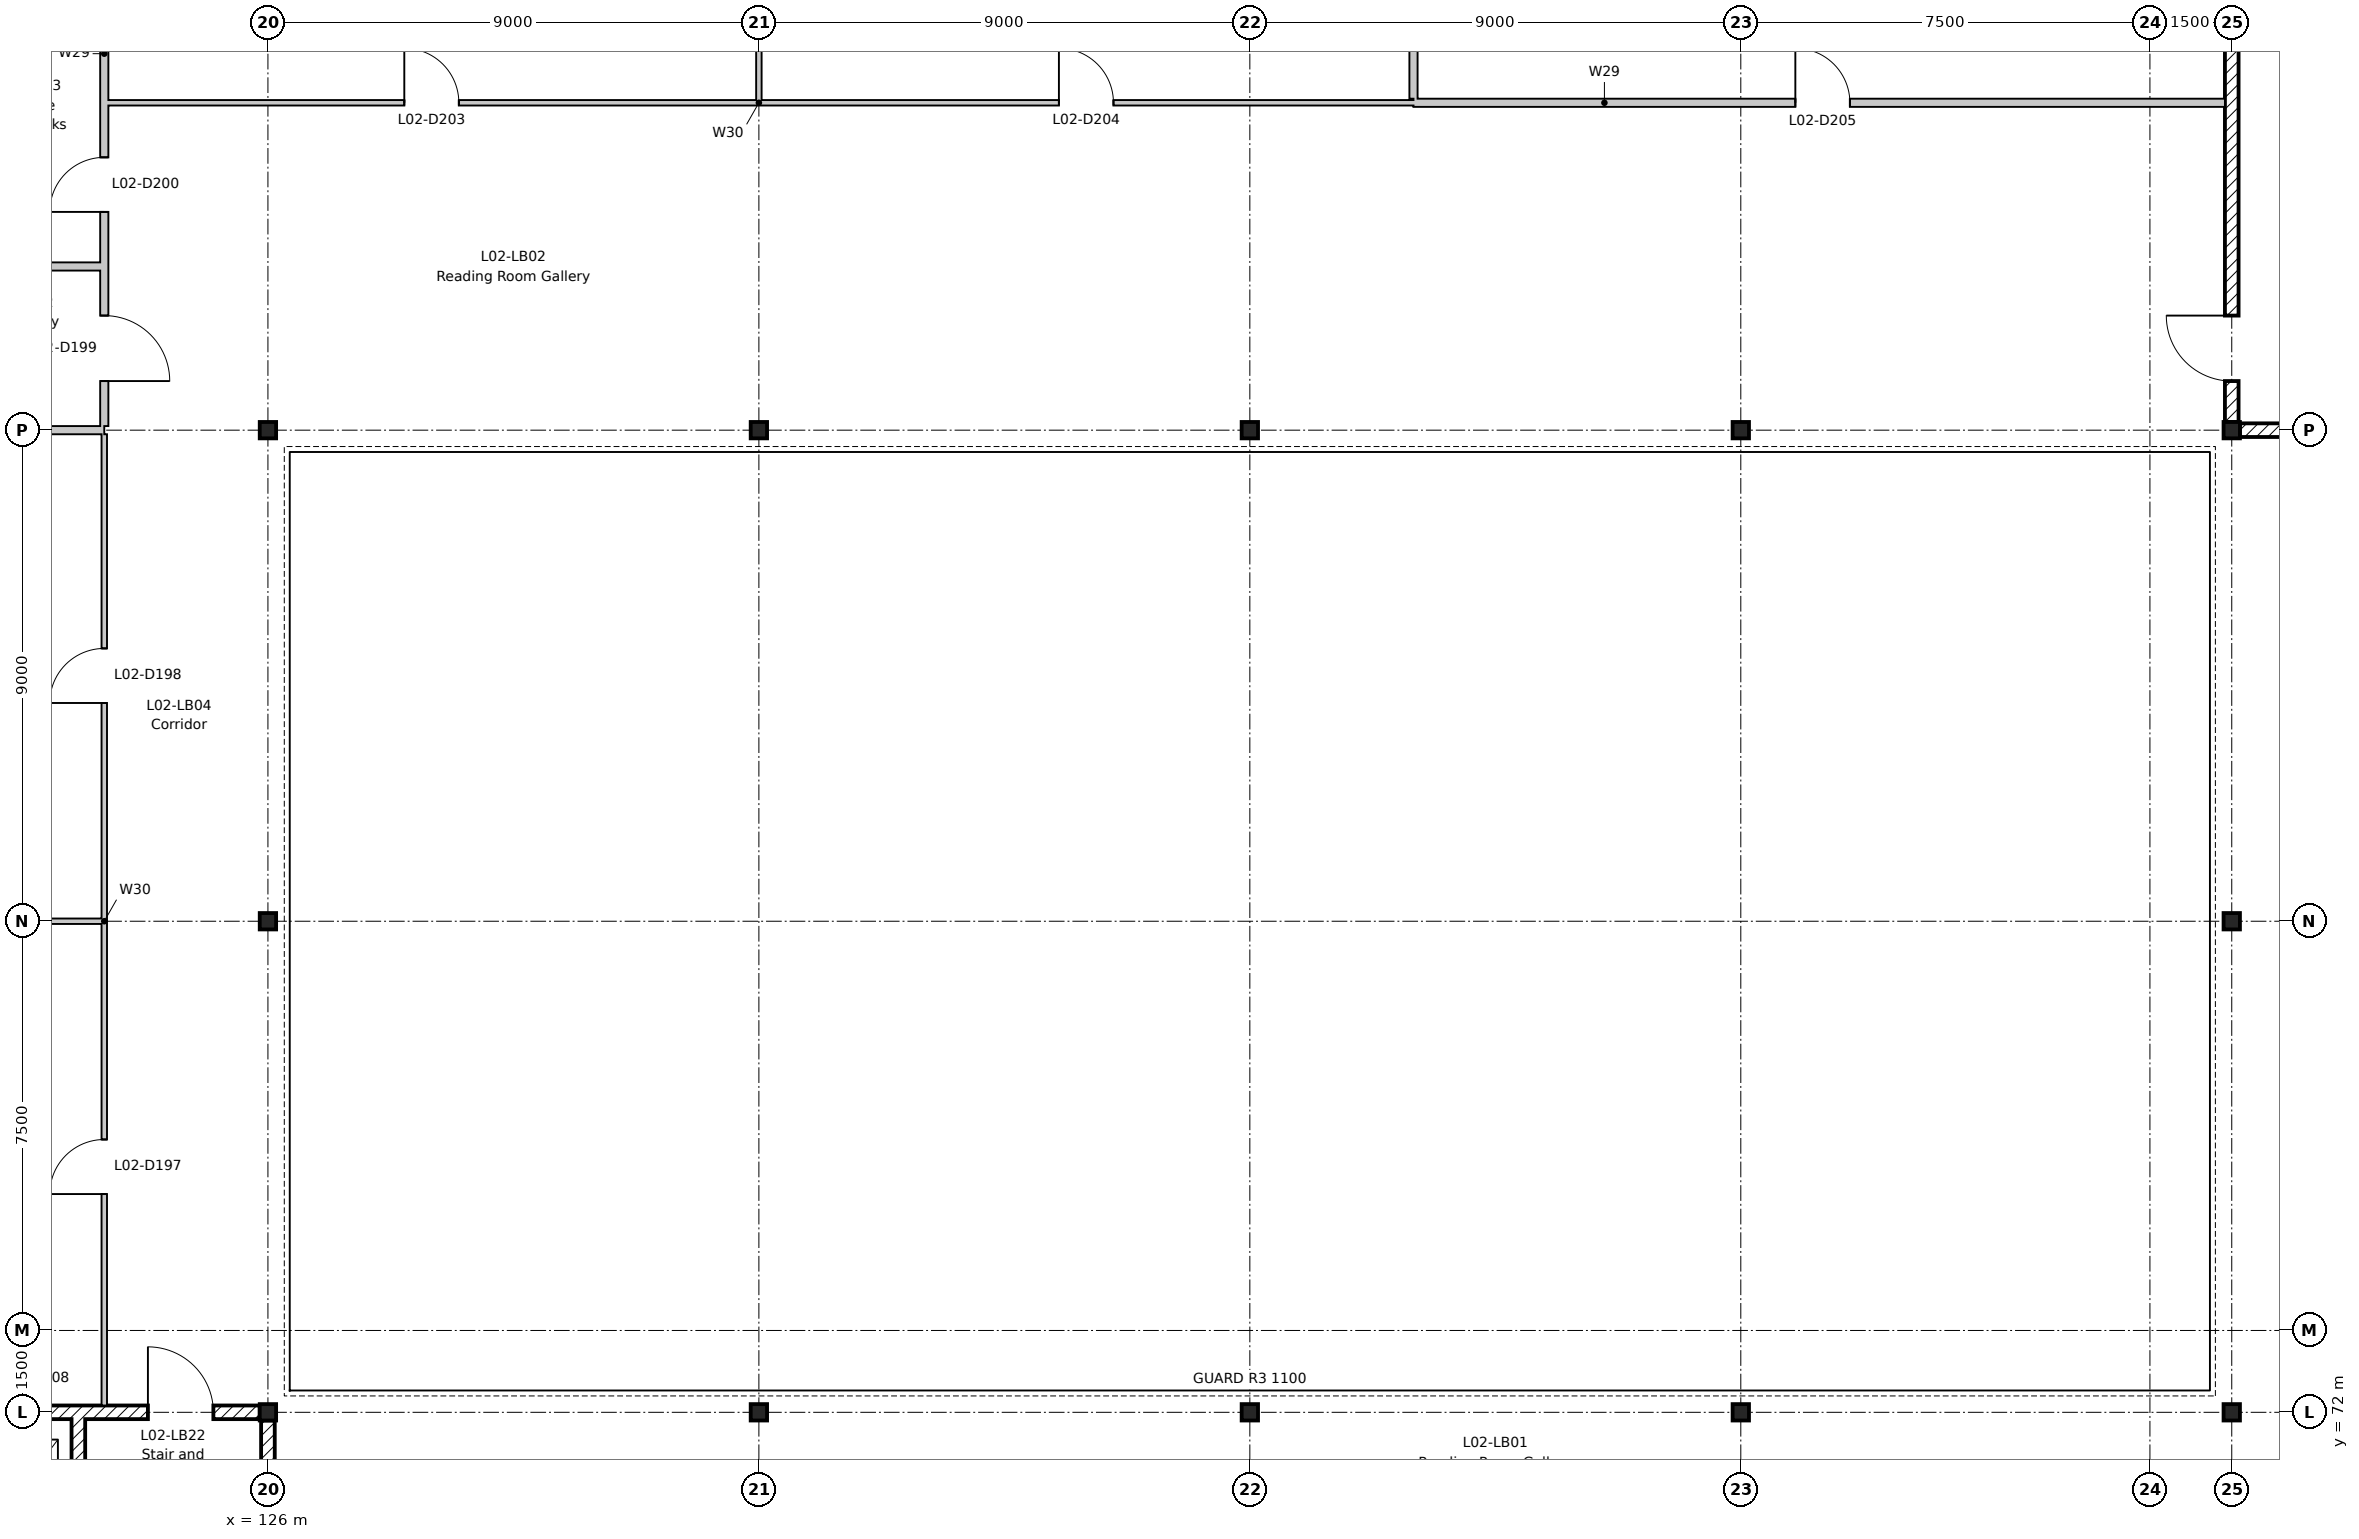
"""IFC4 building model, lengths in metres.
Left out: names, types, materials, properties, quantities, classifications, styles, units other than length and angle.
Written with IfcOpenShell. Run it as: python <this file> out.ifc"""

import sys

from ifc_helpers import new_model, si_unit, direction, frame, frame_2d, origin, origin_2d, place, context, subcontext, project, spatial, rectangle, i_section, extrude, element, fill, save


model = new_model("IFC4")
c1 = context("Model", 3, precision=1e-05, world=origin(), true_north=direction((0.0, 1.0)))
c2 = subcontext(c1, "Body", "Model", "MODEL_VIEW")
j1 = project(units=[si_unit("LENGTHUNIT", "METRE"), si_unit("PLANEANGLEUNIT", "RADIAN")], contexts=[c1])
p1 = place(None, origin())
s1 = spatial("IfcSite", under=j1, at=p1, CompositionType="ELEMENT")
p2 = place(p1, origin())
s2 = spatial("IfcBuilding", under=s1, at=p2, CompositionType="ELEMENT")
p3 = place(p2, frame((0.0, 0.0, 9.9)))
s3 = spatial("IfcBuildingStorey", under=s2, at=p3, CompositionType="ELEMENT", Elevation=9.9)
for number, where, z_axis, x_axis in (
    (1, (126.0, 72.0, -0.2), (0.0, 0.0, 1.0), (1.0, 0.0, 0.0)),
    (2, (126.0, 81.0, -0.2), (0.0, 0.0, 1.0), (1.0, 0.0, 0.0)),
    (3, (126.0, 90.0, -0.2), (0.0, 0.0, 1.0), (1.0, 0.0, 0.0)),
    (4, (135.0, 72.0, -0.2), (0.0, 0.0, 1.0), (1.0, 0.0, 0.0)),
    (5, (135.0, 90.0, -0.2), (0.0, 0.0, 1.0), (1.0, 0.0, 0.0)),
    (6, (144.0, 72.0, -0.2), (0.0, 0.0, 1.0), (1.0, 0.0, 0.0)),
    (7, (144.0, 90.0, -0.2), (0.0, 0.0, 1.0), (1.0, 0.0, 0.0)),
    (8, (153.0, 72.0, -0.2), (0.0, 0.0, 1.0), (1.0, 0.0, 0.0)),
    (9, (153.0, 90.0, -0.2), (0.0, 0.0, 1.0), (1.0, 0.0, 0.0)),
    (10, (162.0, 72.0, -0.2), (0.0, 0.0, 1.0), (1.0, 0.0, 0.0)),
    (11, (162.0, 81.0, -0.2), (0.0, 0.0, 1.0), (1.0, 0.0, 0.0)),
    (12, (162.0, 90.0, -0.2), (0.0, 0.0, 1.0), (1.0, 0.0, 0.0)),
):
    element("IfcColumn", number, at=place(p3, frame(where, z_axis=z_axis, x_axis=x_axis)), inside=s3, PredefinedType="COLUMN", context=c2, shape_type="SweptSolid", body=[
        extrude(i_section(OverallWidth=0.3, OverallDepth=0.3, WebThickness=0.011, FlangeThickness=0.019, FilletRadius=0.027, at=origin_2d()), origin(), (0.0, 0.0, 1.0), 4.45),
    ])
p4 = place(p3, frame((126.0, 63.2, 0.0), z_axis=(0.0, 0.0, 1.0), x_axis=(0.0, 1.0, 0.0)))
e13 = element("IfcWall", 13, at=p4, inside=s3, PredefinedType="SHEAR", context=c2, shape_type="SweptSolid", body=[
    extrude(rectangle(XDim=8.65, YDim=0.25, at=frame_2d((4.325, 0.0))), origin(), (0.0, 0.0, 1.0), 4.25),
])
p5 = place(p4, frame((6.7, 0.0, 0.0)))
e14 = element("IfcOpeningElement", 14, at=p5, cuts=e13, PredefinedType="OPENING", context=c2, shape_type="SweptSolid", body=[
    extrude(rectangle(XDim=1.2, YDim=2.1, at=frame_2d((0.6, 1.05))), frame((0.0, 0.135, 0.0), z_axis=(0.0, -1.0, 0.0), x_axis=(1.0, 0.0, 0.0)), (0.0, 0.0, 1.0), 0.27),
])
p6 = place(p3, frame((117.2, 72.0, 0.0), z_axis=(0.0, 0.0, 1.0), x_axis=(1.0, 0.0, 0.0)))
e15 = element("IfcWall", 15, at=p6, inside=s3, PredefinedType="SHEAR", context=c2, shape_type="SweptSolid", body=[
    extrude(rectangle(XDim=8.65, YDim=0.25, at=frame_2d((4.325, 0.0))), origin(), (0.0, 0.0, 1.0), 4.25),
])
p7 = place(p6, frame((6.6, 0.0, 0.0)))
e16 = element("IfcOpeningElement", 16, at=p7, cuts=e15, PredefinedType="OPENING", context=c2, shape_type="SweptSolid", body=[
    extrude(rectangle(XDim=1.2, YDim=2.1, at=frame_2d((0.6, 1.05))), frame((0.0, 0.135, 0.0), z_axis=(0.0, -1.0, 0.0), x_axis=(1.0, 0.0, 0.0)), (0.0, 0.0, 1.0), 0.27),
])
p8 = place(p3, frame((122.525, 69.275, 0.0), z_axis=(0.0, 0.0, 1.0), x_axis=(0.0, 1.0, 0.0)))
e17 = element("IfcWall", 17, at=p8, inside=s3, PredefinedType="SHEAR", context=c2, shape_type="SweptSolid", body=[
    extrude(rectangle(XDim=2.6, YDim=0.25, at=frame_2d((1.3, 0.0))), origin(), (0.0, 0.0, 1.0), 4.25),
])
p9 = place(p3, frame((162.0, 98.8, 0.0), z_axis=(0.0, 0.0, 1.0), x_axis=(0.0, -1.0, 0.0)))
e18 = element("IfcWall", 18, at=p9, inside=s3, PredefinedType="SHEAR", context=c2, shape_type="SweptSolid", body=[
    extrude(rectangle(XDim=8.65, YDim=0.25, at=frame_2d((4.325, 0.0))), origin(), (0.0, 0.0, 1.0), 4.25),
])
p10 = place(p9, frame((6.7, 0.0, 0.0)))
e19 = element("IfcOpeningElement", 19, at=p10, cuts=e18, PredefinedType="OPENING", context=c2, shape_type="SweptSolid", body=[
    extrude(rectangle(XDim=1.2, YDim=2.1, at=frame_2d((0.6, 1.05))), frame((0.0, 0.135, 0.0), z_axis=(0.0, -1.0, 0.0), x_axis=(1.0, 0.0, 0.0)), (0.0, 0.0, 1.0), 0.27),
])
p11 = place(p3, frame((170.8, 90.0, 0.0), z_axis=(0.0, 0.0, 1.0), x_axis=(-1.0, 0.0, 0.0)))
e20 = element("IfcWall", 20, at=p11, inside=s3, PredefinedType="SHEAR", context=c2, shape_type="SweptSolid", body=[
    extrude(rectangle(XDim=8.65, YDim=0.25, at=frame_2d((4.325, 0.0))), origin(), (0.0, 0.0, 1.0), 4.25),
])
p12 = place(p11, frame((6.6, 0.0, 0.0)))
e21 = element("IfcOpeningElement", 21, at=p12, cuts=e20, PredefinedType="OPENING", context=c2, shape_type="SweptSolid", body=[
    extrude(rectangle(XDim=1.2, YDim=2.1, at=frame_2d((0.6, 1.05))), frame((0.0, 0.135, 0.0), z_axis=(0.0, -1.0, 0.0), x_axis=(1.0, 0.0, 0.0)), (0.0, 0.0, 1.0), 0.27),
])
p13 = place(p3, frame((117.2, 81.0, 0.0), z_axis=(0.0, 0.0, 1.0), x_axis=(1.0, 0.0, 0.0)))
e22 = element("IfcWall", 22, at=p13, inside=s3, PredefinedType="PARTITIONING", context=c2, shape_type="SweptSolid", body=[
    extrude(rectangle(XDim=5.75, YDim=0.1, at=frame_2d((2.875, 0.0))), origin(), (0.0, 0.0, 1.0), 4.25),
])
p14 = place(p3, frame((120.3, 90.0, 0.0), z_axis=(0.0, 0.0, 1.0), x_axis=(1.0, 0.0, 0.0)))
e23 = element("IfcWall", 23, at=p14, inside=s3, PredefinedType="PARTITIONING", context=c2, shape_type="SweptSolid", body=[
    extrude(rectangle(XDim=2.7, YDim=0.15, at=frame_2d((1.35, 0.0))), origin(), (0.0, 0.0, 1.0), 4.25),
])
p15 = place(p3, frame((120.3, 93.0, 0.0), z_axis=(0.0, 0.0, 1.0), x_axis=(1.0, 0.0, 0.0)))
e24 = element("IfcWall", 24, at=p15, inside=s3, PredefinedType="PARTITIONING", context=c2, shape_type="SweptSolid", body=[
    extrude(rectangle(XDim=2.625, YDim=0.15, at=frame_2d((1.312, 0.0))), origin(), (0.0, 0.0, 1.0), 4.25),
])
p16 = place(p3, frame((147.0, 96.0, 0.0), z_axis=(0.0, 0.0, 1.0), x_axis=(1.0, 0.0, 0.0)))
e25 = element("IfcWall", 25, at=p16, inside=s3, PredefinedType="PARTITIONING", context=c2, shape_type="SweptSolid", body=[
    extrude(rectangle(XDim=14.875, YDim=0.15, at=frame_2d((7.438, 0.0))), origin(), (0.0, 0.0, 1.0), 4.25),
])
p17 = place(p16, frame((7.0, 0.0, 0.0)))
e26 = element("IfcOpeningElement", 26, at=p17, cuts=e25, PredefinedType="OPENING", context=c2, shape_type="SweptSolid", body=[
    extrude(rectangle(XDim=1.0, YDim=2.1, at=frame_2d((0.5, 1.05))), frame((0.0, 0.085, 0.0), z_axis=(0.0, -1.0, 0.0), x_axis=(1.0, 0.0, 0.0)), (0.0, 0.0, 1.0), 0.17),
])
p18 = place(p3, frame((123.075, 96.0, 0.0), z_axis=(0.0, 0.0, 1.0), x_axis=(1.0, 0.0, 0.0)))
e27 = element("IfcWall", 27, at=p18, inside=s3, PredefinedType="PARTITIONING", context=c2, shape_type="SweptSolid", body=[
    extrude(rectangle(XDim=23.925, YDim=0.1, at=frame_2d((11.962, 0.0))), origin(), (0.0, 0.0, 1.0), 4.25),
])
p19 = place(p18, frame((5.425, 0.0, 0.0)))
e28 = element("IfcOpeningElement", 28, at=p19, cuts=e27, PredefinedType="OPENING", context=c2, shape_type="SweptSolid", body=[
    extrude(rectangle(XDim=1.0, YDim=2.1, at=frame_2d((0.5, 1.05))), frame((0.0, 0.06, 0.0), z_axis=(0.0, -1.0, 0.0), x_axis=(1.0, 0.0, 0.0)), (0.0, 0.0, 1.0), 0.12),
])
p20 = place(p18, frame((17.425, 0.0, 0.0)))
e29 = element("IfcOpeningElement", 29, at=p20, cuts=e27, PredefinedType="OPENING", context=c2, shape_type="SweptSolid", body=[
    extrude(rectangle(XDim=1.0, YDim=2.1, at=frame_2d((0.5, 1.05))), frame((0.0, 0.06, 0.0), z_axis=(0.0, -1.0, 0.0), x_axis=(1.0, 0.0, 0.0)), (0.0, 0.0, 1.0), 0.12),
])
p21 = place(p3, frame((123.0, 90.075, 0.0), z_axis=(0.0, 0.0, 1.0), x_axis=(0.0, 1.0, 0.0)))
e30 = element("IfcWall", 30, at=p21, inside=s3, PredefinedType="PARTITIONING", context=c2, shape_type="SweptSolid", body=[
    extrude(rectangle(XDim=8.725, YDim=0.15, at=frame_2d((4.363, 0.0))), origin(), (0.0, 0.0, 1.0), 4.25),
])
p22 = place(p21, frame((0.825, 0.0, 0.0)))
e31 = element("IfcOpeningElement", 31, at=p22, cuts=e30, PredefinedType="OPENING", context=c2, shape_type="SweptSolid", body=[
    extrude(rectangle(XDim=1.2, YDim=2.1, at=frame_2d((0.6, 1.05))), frame((0.0, 0.085, 0.0), z_axis=(0.0, -1.0, 0.0), x_axis=(1.0, 0.0, 0.0)), (0.0, 0.0, 1.0), 0.17),
])
p23 = place(p21, frame((3.925, 0.0, 0.0)))
e32 = element("IfcOpeningElement", 32, at=p23, cuts=e30, PredefinedType="OPENING", context=c2, shape_type="SweptSolid", body=[
    extrude(rectangle(XDim=1.0, YDim=2.1, at=frame_2d((0.5, 1.05))), frame((0.0, 0.085, 0.0), z_axis=(0.0, -1.0, 0.0), x_axis=(1.0, 0.0, 0.0)), (0.0, 0.0, 1.0), 0.17),
])
p24 = place(p3, frame((123.0, 72.125, 0.0), z_axis=(0.0, 0.0, 1.0), x_axis=(0.0, 1.0, 0.0)))
e33 = element("IfcWall", 33, at=p24, inside=s3, PredefinedType="PARTITIONING", context=c2, shape_type="SweptSolid", body=[
    extrude(rectangle(XDim=17.8, YDim=0.1, at=frame_2d((8.9, 0.0))), origin(), (0.0, 0.0, 1.0), 4.25),
])
p25 = place(p24, frame((3.875, 0.0, 0.0)))
e34 = element("IfcOpeningElement", 34, at=p25, cuts=e33, PredefinedType="OPENING", context=c2, shape_type="SweptSolid", body=[
    extrude(rectangle(XDim=1.0, YDim=2.1, at=frame_2d((0.5, 1.05))), frame((0.0, 0.06, 0.0), z_axis=(0.0, -1.0, 0.0), x_axis=(1.0, 0.0, 0.0)), (0.0, 0.0, 1.0), 0.12),
])
p26 = place(p24, frame((12.875, 0.0, 0.0)))
e35 = element("IfcOpeningElement", 35, at=p26, cuts=e33, PredefinedType="OPENING", context=c2, shape_type="SweptSolid", body=[
    extrude(rectangle(XDim=1.0, YDim=2.1, at=frame_2d((0.5, 1.05))), frame((0.0, 0.06, 0.0), z_axis=(0.0, -1.0, 0.0), x_axis=(1.0, 0.0, 0.0)), (0.0, 0.0, 1.0), 0.12),
])
p27 = place(p3, frame((135.0, 96.05, 0.0), z_axis=(0.0, 0.0, 1.0), x_axis=(0.0, 1.0, 0.0)))
e36 = element("IfcWall", 36, at=p27, inside=s3, PredefinedType="PARTITIONING", context=c2, shape_type="SweptSolid", body=[
    extrude(rectangle(XDim=2.75, YDim=0.1, at=frame_2d((1.375, 0.0))), origin(), (0.0, 0.0, 1.0), 4.25),
])
p28 = place(p3, frame((147.0, 96.075, 0.0), z_axis=(0.0, 0.0, 1.0), x_axis=(0.0, 1.0, 0.0)))
e37 = element("IfcWall", 37, at=p28, inside=s3, PredefinedType="PARTITIONING", context=c2, shape_type="SweptSolid", body=[
    extrude(rectangle(XDim=2.725, YDim=0.15, at=frame_2d((1.363, 0.0))), origin(), (0.0, 0.0, 1.0), 4.25),
])
p29 = place(p25, origin())
e38 = element("IfcDoor", 38, at=p29, inside=s3, OperationType="SINGLE_SWING_LEFT", PredefinedType="DOOR", context=c2, shape_type="SweptSolid", body=[
    extrude(rectangle(XDim=1.0, YDim=2.1, at=frame_2d((0.5, 1.05))), frame((0.0, 0.025, 0.0), z_axis=(0.0, -1.0, 0.0), x_axis=(1.0, 0.0, 0.0)), (0.0, 0.0, 1.0), 0.05),
])
fill(e34, e38)
p30 = place(p26, origin())
e39 = element("IfcDoor", 39, at=p30, inside=s3, OperationType="SINGLE_SWING_LEFT", PredefinedType="DOOR", context=c2, shape_type="SweptSolid", body=[
    extrude(rectangle(XDim=1.0, YDim=2.1, at=frame_2d((0.5, 1.05))), frame((0.0, 0.025, 0.0), z_axis=(0.0, -1.0, 0.0), x_axis=(1.0, 0.0, 0.0)), (0.0, 0.0, 1.0), 0.05),
])
fill(e35, e39)
p31 = place(p22, frame((1.2, 0.0, 0.0), z_axis=(0.0, 0.0, 1.0), x_axis=(-1.0, 0.0, 0.0)))
e40 = element("IfcDoor", 40, at=p31, inside=s3, OperationType="SINGLE_SWING_RIGHT", PredefinedType="DOOR", context=c2, shape_type="SweptSolid", body=[
    extrude(rectangle(XDim=1.2, YDim=2.1, at=frame_2d((0.6, 1.05))), frame((0.0, 0.025, 0.0), z_axis=(0.0, -1.0, 0.0), x_axis=(1.0, 0.0, 0.0)), (0.0, 0.0, 1.0), 0.05),
])
fill(e31, e40)
p32 = place(p23, origin())
e41 = element("IfcDoor", 41, at=p32, inside=s3, OperationType="SINGLE_SWING_LEFT", PredefinedType="DOOR", context=c2, shape_type="SweptSolid", body=[
    extrude(rectangle(XDim=1.0, YDim=2.1, at=frame_2d((0.5, 1.05))), frame((0.0, 0.025, 0.0), z_axis=(0.0, -1.0, 0.0), x_axis=(1.0, 0.0, 0.0)), (0.0, 0.0, 1.0), 0.05),
])
fill(e32, e41)
p33 = place(p19, origin())
e42 = element("IfcDoor", 42, at=p33, inside=s3, OperationType="SINGLE_SWING_LEFT", PredefinedType="DOOR", context=c2, shape_type="SweptSolid", body=[
    extrude(rectangle(XDim=1.0, YDim=2.1, at=frame_2d((0.5, 1.05))), frame((0.0, 0.025, 0.0), z_axis=(0.0, -1.0, 0.0), x_axis=(1.0, 0.0, 0.0)), (0.0, 0.0, 1.0), 0.05),
])
fill(e28, e42)
p34 = place(p20, origin())
e43 = element("IfcDoor", 43, at=p34, inside=s3, OperationType="SINGLE_SWING_LEFT", PredefinedType="DOOR", context=c2, shape_type="SweptSolid", body=[
    extrude(rectangle(XDim=1.0, YDim=2.1, at=frame_2d((0.5, 1.05))), frame((0.0, 0.025, 0.0), z_axis=(0.0, -1.0, 0.0), x_axis=(1.0, 0.0, 0.0)), (0.0, 0.0, 1.0), 0.05),
])
fill(e29, e43)
p35 = place(p17, origin())
e44 = element("IfcDoor", 44, at=p35, inside=s3, OperationType="SINGLE_SWING_LEFT", PredefinedType="DOOR", context=c2, shape_type="SweptSolid", body=[
    extrude(rectangle(XDim=1.0, YDim=2.1, at=frame_2d((0.5, 1.05))), frame((0.0, 0.025, 0.0), z_axis=(0.0, -1.0, 0.0), x_axis=(1.0, 0.0, 0.0)), (0.0, 0.0, 1.0), 0.05),
])
fill(e26, e44)
p36 = place(p7, origin())
e45 = element("IfcDoor", 45, at=p36, inside=s3, OperationType="SINGLE_SWING_LEFT", PredefinedType="DOOR", context=c2, shape_type="SweptSolid", body=[
    extrude(rectangle(XDim=1.2, YDim=2.1, at=frame_2d((0.6, 1.05))), frame((0.0, 0.025, 0.0), z_axis=(0.0, -1.0, 0.0), x_axis=(1.0, 0.0, 0.0)), (0.0, 0.0, 1.0), 0.05),
])
fill(e16, e45)
p37 = place(p10, frame((1.2, 0.0, 0.0), z_axis=(0.0, 0.0, 1.0), x_axis=(-1.0, 0.0, 0.0)))
e46 = element("IfcDoor", 46, at=p37, inside=s3, OperationType="SINGLE_SWING_RIGHT", PredefinedType="DOOR", context=c2, shape_type="SweptSolid", body=[
    extrude(rectangle(XDim=1.2, YDim=2.1, at=frame_2d((0.6, 1.05))), frame((0.0, 0.025, 0.0), z_axis=(0.0, -1.0, 0.0), x_axis=(1.0, 0.0, 0.0)), (0.0, 0.0, 1.0), 0.05),
])
fill(e19, e46)
save(model, sys.argv[1])
